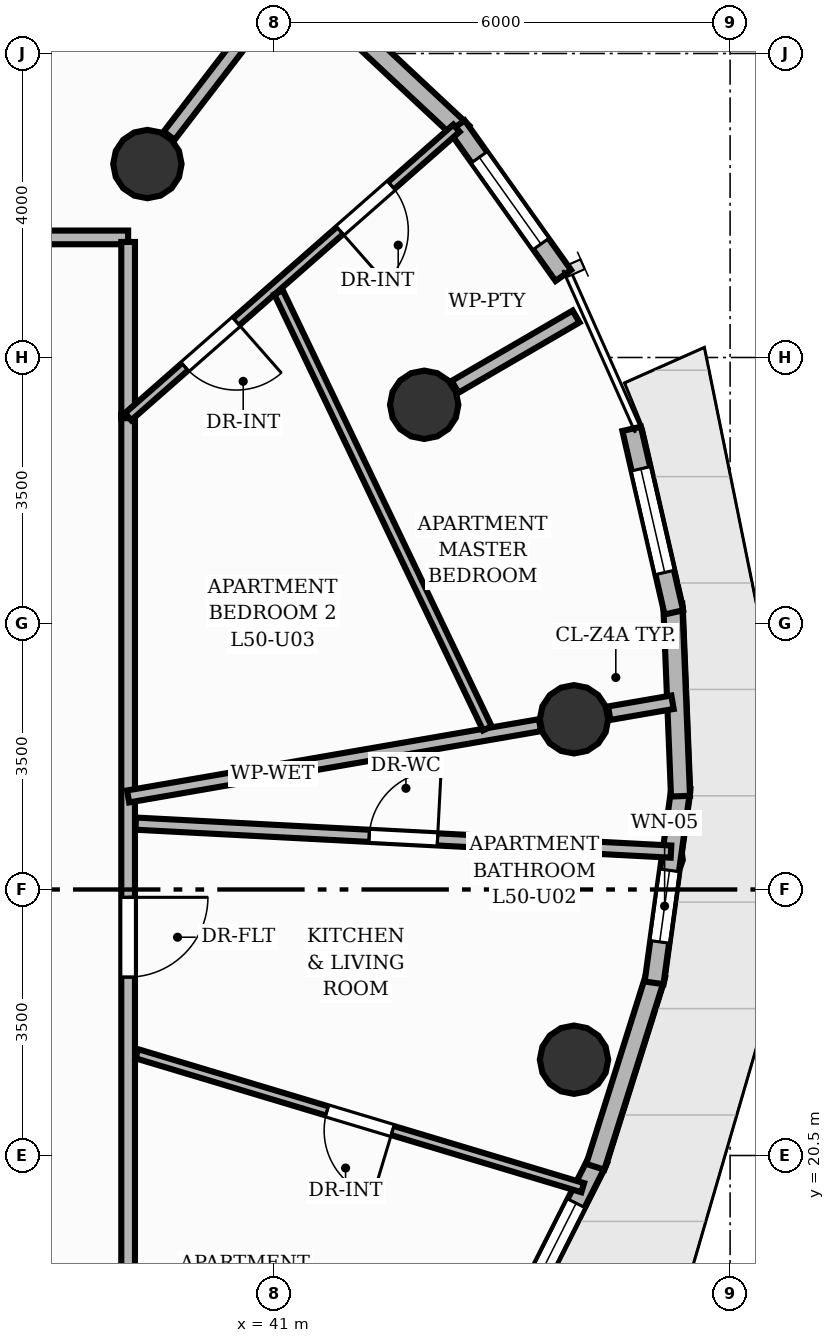
"""IFC4 building model, lengths in metres.
Left out: names, types, materials, properties, quantities, classifications, styles, units other than length and angle.
Written with IfcOpenShell. Run it as: python <this file> out.ifc"""

import sys

from ifc_helpers import new_model, si_unit, direction, frame, frame_2d, origin, origin_2d, place, context, subcontext, project, spatial, rectangle, circle, extrude, element, fill, save


model = new_model("IFC4")
c1 = context("Model", 3, precision=1e-05, world=origin(), true_north=direction((0.0, 1.0)))
c2 = subcontext(c1, "Body", "Model", "MODEL_VIEW")
j1 = project(units=[si_unit("LENGTHUNIT", "METRE"), si_unit("PLANEANGLEUNIT", "RADIAN")], contexts=[c1])
p1 = place(None, origin())
s1 = spatial("IfcSite", under=j1, at=p1, CompositionType="ELEMENT")
p2 = place(p1, origin())
s2 = spatial("IfcBuilding", under=s1, at=p2, CompositionType="ELEMENT")
p3 = place(p2, frame((0.0, 0.0, 169.44)))
s3 = spatial("IfcBuildingStorey", under=s2, at=p3, CompositionType="ELEMENT", Elevation=169.44)
for number, where, z_axis, x_axis in (
    (1, (44.946, 26.24, 0.0), (0.0, 0.0, 1.0), (1.0, 0.0, 0.0)),
    (2, (42.975, 30.378, 0.0), (0.0, 0.0, 1.0), (1.0, 0.0, 0.0)),
    (3, (39.333, 33.545, 0.0), (0.0, 0.0, 1.0), (1.0, 0.0, 0.0)),
    (4, (44.946, 21.76, 0.0), (0.0, 0.0, 1.0), (1.0, 0.0, 0.0)),
):
    element("IfcColumn", number, at=place(p3, frame(where, z_axis=z_axis, x_axis=x_axis)), inside=s3, PredefinedType="COLUMN", context=c2, shape_type="SweptSolid", body=[
        extrude(circle(Radius=0.45, at=origin_2d()), origin(), (0.0, 0.0, 1.0), 3.2),
    ])
p4 = place(p3, frame((41.718, 35.611, 0.0), z_axis=(0.0, 0.0, 1.0), x_axis=(0.730224222865, -0.683207570465, 0.0)))
e5 = element("IfcWall", 5, at=p4, inside=s3, PredefinedType="SOLIDWALL", context=c2, shape_type="SweptSolid", body=[
    extrude(rectangle(XDim=2.415, YDim=0.25, at=frame_2d((1.207, 0.0))), origin(), (0.0, 0.0, 1.0), 2.96),
])
p5 = place(p3, frame((45.268, 20.453, 0.0), z_axis=(0.0, 0.0, 1.0), x_axis=(-0.450391703917, -0.892831066352, 0.0)))
e6 = element("IfcWall", 6, at=p5, inside=s3, PredefinedType="SOLIDWALL", context=c2, shape_type="SweptSolid", body=[
    extrude(rectangle(XDim=2.702, YDim=0.25, at=frame_2d((1.351, 0.0))), origin(), (0.0, 0.0, 1.0), 2.96),
])
p6 = place(p5, frame((0.651, 0.0, 0.85)))
e7 = element("IfcOpeningElement", 7, at=p6, cuts=e6, PredefinedType="OPENING", context=c2, shape_type="SweptSolid", body=[
    extrude(rectangle(XDim=1.4, YDim=1.55, at=frame_2d((0.7, 0.775))), frame((0.0, 0.135, 0.0), z_axis=(0.0, -1.0, 0.0), x_axis=(1.0, 0.0, 0.0)), (0.0, 0.0, 1.0), 0.27),
])
p7 = place(p3, frame((46.024, 22.88, 0.0), z_axis=(0.0, 0.0, 1.0), x_axis=(-0.300796358401, -0.953688392911, 0.0)))
e8 = element("IfcWall", 8, at=p7, inside=s3, PredefinedType="SOLIDWALL", context=c2, shape_type="SweptSolid", body=[
    extrude(rectangle(XDim=2.651, YDim=0.25, at=frame_2d((1.325, 0.0))), origin(), (0.0, 0.0, 1.0), 2.96),
])
p8 = place(p3, frame((46.353, 25.34, 0.0), z_axis=(0.0, 0.0, 1.0), x_axis=(-0.136289981327, -0.990668986589, 0.0)))
e9 = element("IfcWall", 9, at=p8, inside=s3, PredefinedType="SOLIDWALL", context=c2, shape_type="SweptSolid", body=[
    extrude(rectangle(XDim=2.592, YDim=0.25, at=frame_2d((1.296, 0.0))), origin(), (0.0, 0.0, 1.0), 2.96),
])
p9 = place(p8, frame((1.098, 0.0, 0.85)))
e10 = element("IfcOpeningElement", 10, at=p9, cuts=e9, PredefinedType="OPENING", context=c2, shape_type="SweptSolid", body=[
    extrude(rectangle(XDim=0.95, YDim=1.45, at=frame_2d((0.475, 0.725))), frame((0.0, 0.135, 0.0), z_axis=(0.0, -1.0, 0.0), x_axis=(1.0, 0.0, 0.0)), (0.0, 0.0, 1.0), 0.27),
])
p10 = place(p3, frame((46.245, 27.758, 0.0), z_axis=(0.0, 0.0, 1.0), x_axis=(0.040399298921, -0.999183615081, 0.0)))
e11 = element("IfcWall", 11, at=p10, inside=s3, PredefinedType="SOLIDWALL", context=c2, shape_type="SweptSolid", body=[
    extrude(rectangle(XDim=2.532, YDim=0.25, at=frame_2d((1.266, 0.0))), origin(), (0.0, 0.0, 1.0), 2.96),
])
p11 = place(p3, frame((45.705, 30.061, 0.0), z_axis=(0.0, 0.0, 1.0), x_axis=(0.224175769227, -0.974548728639, 0.0)))
e12 = element("IfcWall", 12, at=p11, inside=s3, PredefinedType="SOLIDWALL", context=c2, shape_type="SweptSolid", body=[
    extrude(rectangle(XDim=2.478, YDim=0.25, at=frame_2d((1.239, 0.0))), origin(), (0.0, 0.0, 1.0), 2.96),
])
p12 = place(p11, frame((0.539, 0.0, 0.85)))
e13 = element("IfcOpeningElement", 13, at=p12, cuts=e12, PredefinedType="OPENING", context=c2, shape_type="SweptSolid", body=[
    extrude(rectangle(XDim=1.4, YDim=1.55, at=frame_2d((0.7, 0.775))), frame((0.0, 0.135, 0.0), z_axis=(0.0, -1.0, 0.0), x_axis=(1.0, 0.0, 0.0)), (0.0, 0.0, 1.0), 0.27),
])
p13 = place(p3, frame((43.406, 34.047, 0.0), z_axis=(0.0, 0.0, 1.0), x_axis=(0.579505880656, -0.814968057217, 0.0)))
e14 = element("IfcWall", 14, at=p13, inside=s3, PredefinedType="SOLIDWALL", context=c2, shape_type="SweptSolid", body=[
    extrude(rectangle(XDim=2.415, YDim=0.25, at=frame_2d((1.208, 0.0))), origin(), (0.0, 0.0, 1.0), 2.96),
])
p14 = place(p13, frame((0.507, 0.0, 0.85)))
e15 = element("IfcOpeningElement", 15, at=p14, cuts=e14, PredefinedType="OPENING", context=c2, shape_type="SweptSolid", body=[
    extrude(rectangle(XDim=1.4, YDim=1.55, at=frame_2d((0.7, 0.775))), frame((0.0, 0.135, 0.0), z_axis=(0.0, -1.0, 0.0), x_axis=(1.0, 0.0, 0.0)), (0.0, 0.0, 1.0), 0.27),
])
p15 = place(p3, frame((45.409, 26.32, 0.0), z_axis=(0.0, 0.0, 1.0), x_axis=(0.985336508055, 0.170622290144, 0.0)))
e16 = element("IfcWall", 16, at=p15, inside=s3, PredefinedType="PARTITIONING", context=c2, shape_type="SweptSolid", body=[
    extrude(rectangle(XDim=0.846, YDim=0.18, at=frame_2d((0.423, 0.0))), origin(), (0.0, 0.0, 1.0), 2.404),
])
p16 = place(p3, frame((43.382, 30.614, 0.0), z_axis=(0.0, 0.0, 1.0), x_axis=(0.864604991586, 0.502452195264, 0.0)))
e17 = element("IfcWall", 17, at=p16, inside=s3, PredefinedType="PARTITIONING", context=c2, shape_type="SweptSolid", body=[
    extrude(rectangle(XDim=1.841, YDim=0.18, at=frame_2d((0.92, 0.0))), origin(), (0.0, 0.0, 1.0), 2.404),
])
p17 = place(p3, frame((39.62, 33.918, 0.0), z_axis=(0.0, 0.0, 1.0), x_axis=(0.609279402228, 0.792955616678, 0.0)))
e18 = element("IfcWall", 18, at=p17, inside=s3, PredefinedType="PARTITIONING", context=c2, shape_type="SweptSolid", body=[
    extrude(rectangle(XDim=2.49, YDim=0.18, at=frame_2d((1.245, 0.0))), origin(), (0.0, 0.0, 1.0), 2.404),
])
p18 = place(p3, frame((39.08, 30.248, 0.0), z_axis=(0.0, 0.0, 1.0), x_axis=(0.0, -1.0, 0.0)))
e19 = element("IfcWall", 19, at=p18, inside=s3, PredefinedType="PARTITIONING", context=c2, shape_type="SweptSolid", body=[
    extrude(rectangle(XDim=14.828, YDim=0.18, at=frame_2d((7.414, 0.0))), origin(), (0.0, 0.0, 1.0), 2.955),
])
p19 = place(p18, frame((6.351, 0.0, 0.0)))
e20 = element("IfcOpeningElement", 20, at=p19, cuts=e19, PredefinedType="OPENING", context=c2, shape_type="SweptSolid", body=[
    extrude(rectangle(XDim=1.05, YDim=2.15, at=frame_2d((0.525, 1.075))), frame((0.0, 0.1, 0.0), z_axis=(0.0, -1.0, 0.0), x_axis=(1.0, 0.0, 0.0)), (0.0, 0.0, 1.0), 0.2),
])
p20 = place(p3, frame((34.8, 32.58, 0.0), z_axis=(0.0, 0.0, 1.0), x_axis=(1.0, 0.0, 0.0)))
e21 = element("IfcWall", 21, at=p20, inside=s3, PredefinedType="PARTITIONING", context=c2, shape_type="SweptSolid", body=[
    extrude(rectangle(XDim=4.28, YDim=0.18, at=frame_2d((2.14, 0.0))), origin(), (0.0, 0.0, 1.0), 2.955),
])
p21 = place(p20, frame((1.769, 0.0, 0.0)))
e22 = element("IfcOpeningElement", 22, at=p21, cuts=e21, PredefinedType="OPENING", context=c2, shape_type="SweptSolid", body=[
    extrude(rectangle(XDim=1.05, YDim=2.15, at=frame_2d((0.525, 1.075))), frame((0.0, 0.1, 0.0), z_axis=(0.0, -1.0, 0.0), x_axis=(1.0, 0.0, 0.0)), (0.0, 0.0, 1.0), 0.2),
])
p22 = place(p3, frame((39.08, 32.52, 0.0), z_axis=(0.0, 0.0, 1.0), x_axis=(0.0, -1.0, 0.0)))
e23 = element("IfcWall", 23, at=p22, inside=s3, PredefinedType="PARTITIONING", context=c2, shape_type="SweptSolid", body=[
    extrude(rectangle(XDim=2.319, YDim=0.18, at=frame_2d((1.159, 0.0))), origin(), (0.0, 0.0, 1.0), 2.955),
])
p23 = place(p3, frame((39.18, 24.867, 0.0), z_axis=(0.0, 0.0, 1.0), x_axis=(0.998636225788, -0.052208127179, 0.0)))
e24 = element("IfcWall", 24, at=p23, inside=s3, PredefinedType="PLUMBINGWALL", context=c2, shape_type="SweptSolid", body=[
    extrude(rectangle(XDim=7.052, YDim=0.16, at=frame_2d((3.526, 0.0))), origin(), (0.0, 0.0, 1.0), 2.692),
])
p24 = place(p23, frame((3.076, 0.0, 0.0)))
e25 = element("IfcOpeningElement", 25, at=p24, cuts=e24, PredefinedType="OPENING", context=c2, shape_type="SweptSolid", body=[
    extrude(rectangle(XDim=0.9, YDim=2.1, at=frame_2d((0.45, 1.05))), frame((0.0, 0.09, 0.0), z_axis=(0.0, -1.0, 0.0), x_axis=(1.0, 0.0, 0.0)), (0.0, 0.0, 1.0), 0.18),
])
p25 = place(p3, frame((45.061, 20.077, 0.0), z_axis=(0.0, 0.0, 1.0), x_axis=(-0.957731888454, 0.287662353878, 0.0)))
e26 = element("IfcWall", 26, at=p25, inside=s3, PredefinedType="PARTITIONING", context=c2, shape_type="SweptSolid", body=[
    extrude(rectangle(XDim=6.125, YDim=0.125, at=frame_2d((3.062, 0.0))), origin(), (0.0, 0.0, 1.0), 2.692),
])
p26 = place(p25, frame((2.613, 0.0, 0.0)))
e27 = element("IfcOpeningElement", 27, at=p26, cuts=e26, PredefinedType="OPENING", context=c2, shape_type="SweptSolid", body=[
    extrude(rectangle(XDim=0.9, YDim=2.1, at=frame_2d((0.45, 1.05))), frame((0.0, 0.073, 0.0), z_axis=(0.0, -1.0, 0.0), x_axis=(1.0, 0.0, 0.0)), (0.0, 0.0, 1.0), 0.145),
])
p27 = place(p3, frame((39.08, 25.225, 0.0), z_axis=(0.0, 0.0, 1.0), x_axis=(0.985359973695, 0.170486721591, 0.0)))
e28 = element("IfcWall", 28, at=p27, inside=s3, PredefinedType="PLUMBINGWALL", context=c2, shape_type="SweptSolid", body=[
    extrude(rectangle(XDim=5.499, YDim=0.16, at=frame_2d((2.75, 0.0))), origin(), (0.0, 0.0, 1.0), 2.404),
])
p28 = place(p3, frame((35.18, 32.666, 0.0), z_axis=(0.0, 0.0, 1.0), x_axis=(0.518194743754, 0.855262654128, 0.0)))
e29 = element("IfcWall", 29, at=p28, inside=s3, PredefinedType="PLUMBINGWALL", context=c2, shape_type="SweptSolid", body=[
    extrude(rectangle(XDim=5.564, YDim=0.16, at=frame_2d((2.782, 0.0))), origin(), (0.0, 0.0, 1.0), 2.692),
])
p29 = place(p28, frame((2.332, 0.0, 0.0)))
e30 = element("IfcOpeningElement", 30, at=p29, cuts=e29, PredefinedType="OPENING", context=c2, shape_type="SweptSolid", body=[
    extrude(rectangle(XDim=0.9, YDim=2.1, at=frame_2d((0.45, 1.05))), frame((0.0, 0.09, 0.0), z_axis=(0.0, -1.0, 0.0), x_axis=(1.0, 0.0, 0.0)), (0.0, 0.0, 1.0), 0.18),
])
p30 = place(p3, frame((43.4, 34.017, 0.0), z_axis=(0.0, 0.0, 1.0), x_axis=(-0.751212741732, -0.660060161394, 0.0)))
e31 = element("IfcWall", 31, at=p30, inside=s3, PredefinedType="PARTITIONING", context=c2, shape_type="SweptSolid", body=[
    extrude(rectangle(XDim=5.75, YDim=0.125, at=frame_2d((2.875, 0.0))), origin(), (0.0, 0.0, 1.0), 2.955),
])
p31 = place(p30, frame((1.141, 0.0, 0.0)))
e32 = element("IfcOpeningElement", 32, at=p31, cuts=e31, PredefinedType="OPENING", context=c2, shape_type="SweptSolid", body=[
    extrude(rectangle(XDim=0.9, YDim=2.1, at=frame_2d((0.45, 1.05))), frame((0.0, 0.073, 0.0), z_axis=(0.0, -1.0, 0.0), x_axis=(1.0, 0.0, 0.0)), (0.0, 0.0, 1.0), 0.145),
])
p32 = place(p30, frame((3.856, 0.0, 0.0)))
e33 = element("IfcOpeningElement", 33, at=p32, cuts=e31, PredefinedType="OPENING", context=c2, shape_type="SweptSolid", body=[
    extrude(rectangle(XDim=0.9, YDim=2.1, at=frame_2d((0.45, 1.05))), frame((0.0, 0.073, 0.0), z_axis=(0.0, -1.0, 0.0), x_axis=(1.0, 0.0, 0.0)), (0.0, 0.0, 1.0), 0.145),
])
p33 = place(p3, frame((43.806, 26.121, 0.0), z_axis=(0.0, 0.0, 1.0), x_axis=(-0.431903618355, 0.901919766083, 0.0)))
e34 = element("IfcWall", 34, at=p33, inside=s3, PredefinedType="PARTITIONING", context=c2, shape_type="SweptSolid", body=[
    extrude(rectangle(XDim=6.361, YDim=0.125, at=frame_2d((3.18, 0.0))), origin(), (0.0, 0.0, 1.0), 2.488),
])
p34 = place(p6, origin())
e35 = element("IfcWindow", 35, at=p34, inside=s3, PartitioningType="SINGLE_PANEL", PredefinedType="WINDOW", context=c2, shape_type="SweptSolid", body=[
    extrude(rectangle(XDim=1.4, YDim=1.55, at=frame_2d((0.7, 0.775))), frame((0.0, 0.03, 0.0), z_axis=(0.0, -1.0, 0.0), x_axis=(1.0, 0.0, 0.0)), (0.0, 0.0, 1.0), 0.06),
])
fill(e7, e35)
p35 = place(p9, origin())
e36 = element("IfcWindow", 36, at=p35, inside=s3, PartitioningType="SINGLE_PANEL", PredefinedType="WINDOW", context=c2, shape_type="SweptSolid", body=[
    extrude(rectangle(XDim=0.95, YDim=1.45, at=frame_2d((0.475, 0.725))), frame((0.0, 0.03, 0.0), z_axis=(0.0, -1.0, 0.0), x_axis=(1.0, 0.0, 0.0)), (0.0, 0.0, 1.0), 0.06),
])
fill(e10, e36)
p36 = place(p12, origin())
e37 = element("IfcWindow", 37, at=p36, inside=s3, PartitioningType="SINGLE_PANEL", PredefinedType="WINDOW", context=c2, shape_type="SweptSolid", body=[
    extrude(rectangle(XDim=1.4, YDim=1.55, at=frame_2d((0.7, 0.775))), frame((0.0, 0.03, 0.0), z_axis=(0.0, -1.0, 0.0), x_axis=(1.0, 0.0, 0.0)), (0.0, 0.0, 1.0), 0.06),
])
fill(e13, e37)
p37 = place(p14, origin())
e38 = element("IfcWindow", 38, at=p37, inside=s3, PartitioningType="SINGLE_PANEL", PredefinedType="WINDOW", context=c2, shape_type="SweptSolid", body=[
    extrude(rectangle(XDim=1.4, YDim=1.55, at=frame_2d((0.7, 0.775))), frame((0.0, 0.03, 0.0), z_axis=(0.0, -1.0, 0.0), x_axis=(1.0, 0.0, 0.0)), (0.0, 0.0, 1.0), 0.06),
])
fill(e15, e38)
p38 = place(p19, origin())
e39 = element("IfcDoor", 39, at=p38, inside=s3, OperationType="SINGLE_SWING_LEFT", PredefinedType="DOOR", context=c2, shape_type="SweptSolid", body=[
    extrude(rectangle(XDim=1.05, YDim=2.15, at=frame_2d((0.525, 1.075))), frame((0.0, 0.025, 0.0), z_axis=(0.0, -1.0, 0.0), x_axis=(1.0, 0.0, 0.0)), (0.0, 0.0, 1.0), 0.05),
])
fill(e20, e39)
p39 = place(p24, origin())
e40 = element("IfcDoor", 40, at=p39, inside=s3, OperationType="SINGLE_SWING_RIGHT", PredefinedType="DOOR", context=c2, shape_type="SweptSolid", body=[
    extrude(rectangle(XDim=0.9, YDim=2.1, at=frame_2d((0.45, 1.05))), frame((0.0, 0.025, 0.0), z_axis=(0.0, -1.0, 0.0), x_axis=(1.0, 0.0, 0.0)), (0.0, 0.0, 1.0), 0.05),
])
fill(e25, e40)
p40 = place(p26, origin())
e41 = element("IfcDoor", 41, at=p40, inside=s3, OperationType="SINGLE_SWING_LEFT", PredefinedType="DOOR", context=c2, shape_type="SweptSolid", body=[
    extrude(rectangle(XDim=0.9, YDim=2.1, at=frame_2d((0.45, 1.05))), frame((0.0, 0.025, 0.0), z_axis=(0.0, -1.0, 0.0), x_axis=(1.0, 0.0, 0.0)), (0.0, 0.0, 1.0), 0.05),
])
fill(e27, e41)
p41 = place(p31, origin())
e42 = element("IfcDoor", 42, at=p41, inside=s3, OperationType="SINGLE_SWING_RIGHT", PredefinedType="DOOR", context=c2, shape_type="SweptSolid", body=[
    extrude(rectangle(XDim=0.9, YDim=2.1, at=frame_2d((0.45, 1.05))), frame((0.0, 0.025, 0.0), z_axis=(0.0, -1.0, 0.0), x_axis=(1.0, 0.0, 0.0)), (0.0, 0.0, 1.0), 0.05),
])
fill(e32, e42)
p42 = place(p32, origin())
e43 = element("IfcDoor", 43, at=p42, inside=s3, OperationType="SINGLE_SWING_LEFT", PredefinedType="DOOR", context=c2, shape_type="SweptSolid", body=[
    extrude(rectangle(XDim=0.9, YDim=2.1, at=frame_2d((0.45, 1.05))), frame((0.0, 0.025, 0.0), z_axis=(0.0, -1.0, 0.0), x_axis=(1.0, 0.0, 0.0)), (0.0, 0.0, 1.0), 0.05),
])
fill(e33, e43)
save(model, sys.argv[1])
